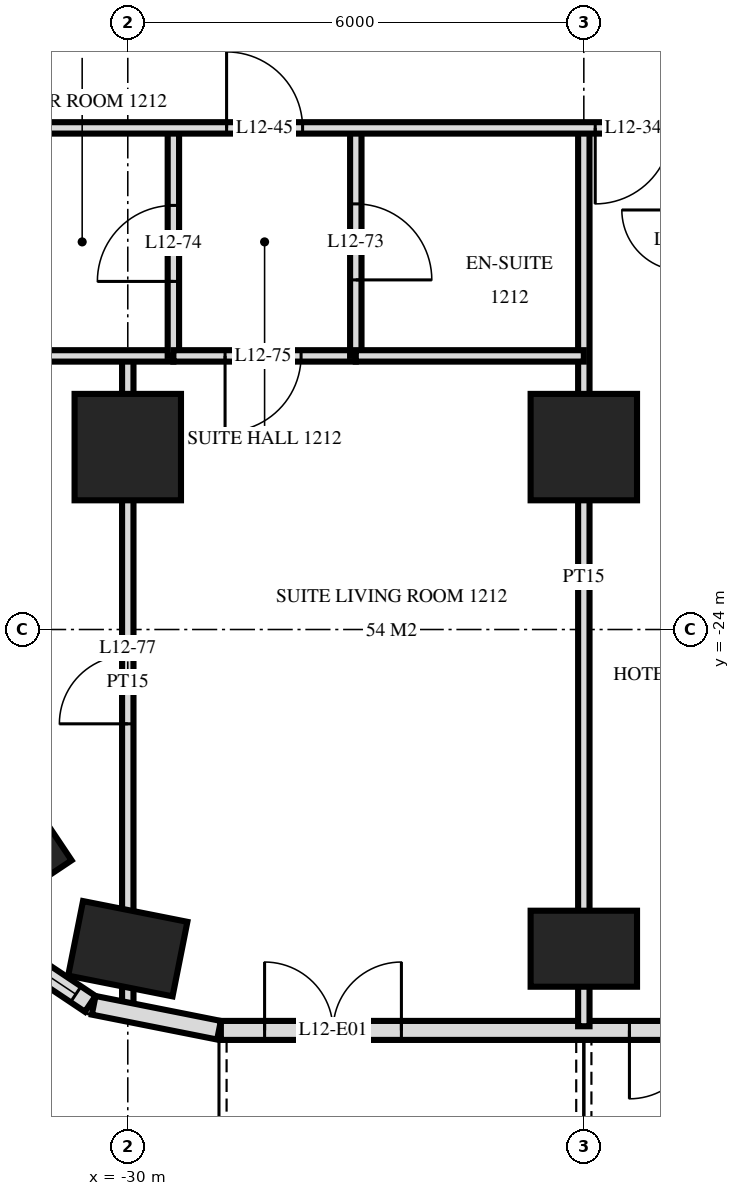
"""IFC4 building model, lengths in metres.
Left out: names, types, materials, properties, quantities, classifications, styles, units other than length and angle.
Written with IfcOpenShell. Run it as: python <this file> out.ifc"""

import sys

from ifc_helpers import new_model, si_unit, direction, frame, frame_2d, origin, origin_2d, place, context, subcontext, project, spatial, rectangle, extrude, element, fill, save


model = new_model("IFC4")
c1 = context("Model", 3, precision=1e-05, world=origin(), true_north=direction((0.0, 1.0)))
c2 = subcontext(c1, "Body", "Model", "MODEL_VIEW")
j1 = project(units=[si_unit("LENGTHUNIT", "METRE"), si_unit("PLANEANGLEUNIT", "RADIAN")], contexts=[c1])
p1 = place(None, origin())
s1 = spatial("IfcSite", under=j1, at=p1, CompositionType="ELEMENT")
p2 = place(p1, origin())
s2 = spatial("IfcBuilding", under=s1, at=p2, CompositionType="ELEMENT")
p3 = place(p2, frame((0.0, 0.0, 52.8)))
s3 = spatial("IfcBuildingStorey", under=s2, at=p3, CompositionType="ELEMENT", Elevation=52.8)
for number, where, z_axis, x_axis in (
    (1, (-31.544, -26.733, 0.0), (0.0, 0.0, 1.0), (-0.556, 0.831, 0.0)),
    (2, (-30.0, -28.2, 0.0), (0.0, 0.0, 1.0), (-0.981, 0.195, 0.0)),
):
    element("IfcColumn", number, at=place(p3, frame(where, z_axis=z_axis, x_axis=x_axis)), inside=s3, PredefinedType="COLUMN", context=c2, shape_type="SweptSolid", body=[
        extrude(rectangle(XDim=1.4, YDim=1.0, at=origin_2d()), origin(), (0.0, 0.0, 1.0), 3.6),
    ])
p4 = place(p3, frame((-30.0, -21.6, 0.0), z_axis=(0.0, 0.0, 1.0), x_axis=(1.0, 0.0, 0.0)))
e3 = element("IfcColumn", 3, at=p4, inside=s3, PredefinedType="COLUMN", context=c2, shape_type="SweptSolid", body=[
    extrude(rectangle(XDim=1.4, YDim=1.4, at=origin_2d()), origin(), (0.0, 0.0, 1.0), 3.6),
])
p5 = place(p3, frame((-24.0, -28.2, 0.0), z_axis=(0.0, 0.0, 1.0), x_axis=(1.0, 0.0, 0.0)))
e4 = element("IfcColumn", 4, at=p5, inside=s3, PredefinedType="COLUMN", context=c2, shape_type="SweptSolid", body=[
    extrude(rectangle(XDim=1.4, YDim=1.0, at=origin_2d()), origin(), (0.0, 0.0, 1.0), 3.6),
])
p6 = place(p3, frame((-24.0, -21.6, 0.0), z_axis=(0.0, 0.0, 1.0), x_axis=(1.0, 0.0, 0.0)))
e5 = element("IfcColumn", 5, at=p6, inside=s3, PredefinedType="COLUMN", context=c2, shape_type="SweptSolid", body=[
    extrude(rectangle(XDim=1.4, YDim=1.4, at=origin_2d()), origin(), (0.0, 0.0, 1.0), 3.6),
])
p7 = place(p3, frame((-31.871, -28.006, 0.0), z_axis=(0.0, 0.0, 1.0), x_axis=(0.831482937015, -0.55555029066, 0.0)))
e6 = element("IfcWall", 6, at=p7, inside=s3, PredefinedType="SOLIDWALL", context=c2, shape_type="SweptSolid", body=[
    extrude(rectangle(XDim=1.656, YDim=0.25, at=frame_2d((0.828, 0.0))), origin(), (0.0, 0.0, 1.0), 3.32),
])
p8 = place(p7, frame((0.228, 0.0, 0.9)))
e7 = element("IfcOpeningElement", 7, at=p8, cuts=e6, PredefinedType="OPENING", context=c2, shape_type="SweptSolid", body=[
    extrude(rectangle(XDim=1.2, YDim=1.5, at=frame_2d((0.6, 0.75))), frame((0.0, 0.135, 0.0), z_axis=(0.0, -1.0, 0.0), x_axis=(1.0, 0.0, 0.0)), (0.0, 0.0, 1.0), 0.27),
])
p9 = place(p3, frame((-30.449, -28.945, 0.0), z_axis=(0.0, 0.0, 1.0), x_axis=(0.980775640221, -0.19513878023, 0.0)))
e8 = element("IfcWall", 8, at=p9, inside=s3, PredefinedType="SOLIDWALL", context=c2, shape_type="SweptSolid", body=[
    extrude(rectangle(XDim=1.681, YDim=0.25, at=frame_2d((0.841, 0.0))), origin(), (0.0, 0.0, 1.0), 3.32),
])
p10 = place(p3, frame((-28.775, -29.275, 0.0), z_axis=(0.0, 0.0, 1.0), x_axis=(1.0, 0.0, 0.0)))
e9 = element("IfcWall", 9, at=p10, inside=s3, PredefinedType="SOLIDWALL", context=c2, shape_type="SweptSolid", body=[
    extrude(rectangle(XDim=57.551, YDim=0.25, at=frame_2d((28.775, 0.0))), origin(), (0.0, 0.0, 1.0), 3.32),
])
p11 = place(p10, frame((0.575, 0.0, 0.0)))
e10 = element("IfcOpeningElement", 10, at=p11, cuts=e9, PredefinedType="OPENING", context=c2, shape_type="SweptSolid", body=[
    extrude(rectangle(XDim=1.8, YDim=2.4, at=frame_2d((0.9, 1.2))), frame((0.0, 0.135, 0.0), z_axis=(0.0, -1.0, 0.0), x_axis=(1.0, 0.0, 0.0)), (0.0, 0.0, 1.0), 0.27),
])
p12 = place(p10, frame((5.375, 0.0, 0.0)))
e11 = element("IfcOpeningElement", 11, at=p12, cuts=e9, PredefinedType="OPENING", context=c2, shape_type="SweptSolid", body=[
    extrude(rectangle(XDim=1.8, YDim=2.4, at=frame_2d((0.9, 1.2))), frame((0.0, 0.135, 0.0), z_axis=(0.0, -1.0, 0.0), x_axis=(1.0, 0.0, 0.0)), (0.0, 0.0, 1.0), 0.27),
])
p13 = place(p10, frame((8.075, 0.0, 0.3)))
e12 = element("IfcOpeningElement", 12, at=p13, cuts=e9, PredefinedType="OPENING", context=c2, shape_type="SweptSolid", body=[
    extrude(rectangle(XDim=2.4, YDim=2.1, at=frame_2d((1.2, 1.05))), frame((0.0, 0.135, 0.0), z_axis=(0.0, -1.0, 0.0), x_axis=(1.0, 0.0, 0.0)), (0.0, 0.0, 1.0), 0.27),
])
p14 = place(p10, frame((11.375, 0.0, 0.0)))
e13 = element("IfcOpeningElement", 13, at=p14, cuts=e9, PredefinedType="OPENING", context=c2, shape_type="SweptSolid", body=[
    extrude(rectangle(XDim=1.8, YDim=2.4, at=frame_2d((0.9, 1.2))), frame((0.0, 0.135, 0.0), z_axis=(0.0, -1.0, 0.0), x_axis=(1.0, 0.0, 0.0)), (0.0, 0.0, 1.0), 0.27),
])
p15 = place(p10, frame((14.075, 0.0, 0.3)))
e14 = element("IfcOpeningElement", 14, at=p15, cuts=e9, PredefinedType="OPENING", context=c2, shape_type="SweptSolid", body=[
    extrude(rectangle(XDim=2.4, YDim=2.1, at=frame_2d((1.2, 1.05))), frame((0.0, 0.135, 0.0), z_axis=(0.0, -1.0, 0.0), x_axis=(1.0, 0.0, 0.0)), (0.0, 0.0, 1.0), 0.27),
])
p16 = place(p10, frame((17.375, 0.0, 0.0)))
e15 = element("IfcOpeningElement", 15, at=p16, cuts=e9, PredefinedType="OPENING", context=c2, shape_type="SweptSolid", body=[
    extrude(rectangle(XDim=1.8, YDim=2.4, at=frame_2d((0.9, 1.2))), frame((0.0, 0.135, 0.0), z_axis=(0.0, -1.0, 0.0), x_axis=(1.0, 0.0, 0.0)), (0.0, 0.0, 1.0), 0.27),
])
p17 = place(p10, frame((20.075, 0.0, 0.3)))
e16 = element("IfcOpeningElement", 16, at=p17, cuts=e9, PredefinedType="OPENING", context=c2, shape_type="SweptSolid", body=[
    extrude(rectangle(XDim=2.4, YDim=2.1, at=frame_2d((1.2, 1.05))), frame((0.0, 0.135, 0.0), z_axis=(0.0, -1.0, 0.0), x_axis=(1.0, 0.0, 0.0)), (0.0, 0.0, 1.0), 0.27),
])
p18 = place(p10, frame((23.075, 0.0, 0.3)))
e17 = element("IfcOpeningElement", 17, at=p18, cuts=e9, PredefinedType="OPENING", context=c2, shape_type="SweptSolid", body=[
    extrude(rectangle(XDim=2.4, YDim=2.1, at=frame_2d((1.2, 1.05))), frame((0.0, 0.135, 0.0), z_axis=(0.0, -1.0, 0.0), x_axis=(1.0, 0.0, 0.0)), (0.0, 0.0, 1.0), 0.27),
])
p19 = place(p10, frame((26.375, 0.0, 0.0)))
e18 = element("IfcOpeningElement", 18, at=p19, cuts=e9, PredefinedType="OPENING", context=c2, shape_type="SweptSolid", body=[
    extrude(rectangle(XDim=1.8, YDim=2.4, at=frame_2d((0.9, 1.2))), frame((0.0, 0.135, 0.0), z_axis=(0.0, -1.0, 0.0), x_axis=(1.0, 0.0, 0.0)), (0.0, 0.0, 1.0), 0.27),
])
p20 = place(p10, frame((29.375, 0.0, 0.0)))
e19 = element("IfcOpeningElement", 19, at=p20, cuts=e9, PredefinedType="OPENING", context=c2, shape_type="SweptSolid", body=[
    extrude(rectangle(XDim=1.8, YDim=2.4, at=frame_2d((0.9, 1.2))), frame((0.0, 0.135, 0.0), z_axis=(0.0, -1.0, 0.0), x_axis=(1.0, 0.0, 0.0)), (0.0, 0.0, 1.0), 0.27),
])
p21 = place(p10, frame((32.075, 0.0, 0.3)))
e20 = element("IfcOpeningElement", 20, at=p21, cuts=e9, PredefinedType="OPENING", context=c2, shape_type="SweptSolid", body=[
    extrude(rectangle(XDim=2.4, YDim=2.1, at=frame_2d((1.2, 1.05))), frame((0.0, 0.135, 0.0), z_axis=(0.0, -1.0, 0.0), x_axis=(1.0, 0.0, 0.0)), (0.0, 0.0, 1.0), 0.27),
])
p22 = place(p10, frame((35.075, 0.0, 0.3)))
e21 = element("IfcOpeningElement", 21, at=p22, cuts=e9, PredefinedType="OPENING", context=c2, shape_type="SweptSolid", body=[
    extrude(rectangle(XDim=2.4, YDim=2.1, at=frame_2d((1.2, 1.05))), frame((0.0, 0.135, 0.0), z_axis=(0.0, -1.0, 0.0), x_axis=(1.0, 0.0, 0.0)), (0.0, 0.0, 1.0), 0.27),
])
p23 = place(p10, frame((38.375, 0.0, 0.0)))
e22 = element("IfcOpeningElement", 22, at=p23, cuts=e9, PredefinedType="OPENING", context=c2, shape_type="SweptSolid", body=[
    extrude(rectangle(XDim=1.8, YDim=2.4, at=frame_2d((0.9, 1.2))), frame((0.0, 0.135, 0.0), z_axis=(0.0, -1.0, 0.0), x_axis=(1.0, 0.0, 0.0)), (0.0, 0.0, 1.0), 0.27),
])
p24 = place(p10, frame((41.375, 0.0, 0.0)))
e23 = element("IfcOpeningElement", 23, at=p24, cuts=e9, PredefinedType="OPENING", context=c2, shape_type="SweptSolid", body=[
    extrude(rectangle(XDim=1.8, YDim=2.4, at=frame_2d((0.9, 1.2))), frame((0.0, 0.135, 0.0), z_axis=(0.0, -1.0, 0.0), x_axis=(1.0, 0.0, 0.0)), (0.0, 0.0, 1.0), 0.27),
])
p25 = place(p10, frame((44.075, 0.0, 0.3)))
e24 = element("IfcOpeningElement", 24, at=p25, cuts=e9, PredefinedType="OPENING", context=c2, shape_type="SweptSolid", body=[
    extrude(rectangle(XDim=2.4, YDim=2.1, at=frame_2d((1.2, 1.05))), frame((0.0, 0.135, 0.0), z_axis=(0.0, -1.0, 0.0), x_axis=(1.0, 0.0, 0.0)), (0.0, 0.0, 1.0), 0.27),
])
p26 = place(p10, frame((47.075, 0.0, 0.3)))
e25 = element("IfcOpeningElement", 25, at=p26, cuts=e9, PredefinedType="OPENING", context=c2, shape_type="SweptSolid", body=[
    extrude(rectangle(XDim=2.4, YDim=2.1, at=frame_2d((1.2, 1.05))), frame((0.0, 0.135, 0.0), z_axis=(0.0, -1.0, 0.0), x_axis=(1.0, 0.0, 0.0)), (0.0, 0.0, 1.0), 0.27),
])
p27 = place(p10, frame((50.375, 0.0, 0.0)))
e26 = element("IfcOpeningElement", 26, at=p27, cuts=e9, PredefinedType="OPENING", context=c2, shape_type="SweptSolid", body=[
    extrude(rectangle(XDim=1.8, YDim=2.4, at=frame_2d((0.9, 1.2))), frame((0.0, 0.135, 0.0), z_axis=(0.0, -1.0, 0.0), x_axis=(1.0, 0.0, 0.0)), (0.0, 0.0, 1.0), 0.27),
])
p28 = place(p10, frame((53.375, 0.0, 0.0)))
e27 = element("IfcOpeningElement", 27, at=p28, cuts=e9, PredefinedType="OPENING", context=c2, shape_type="SweptSolid", body=[
    extrude(rectangle(XDim=1.8, YDim=2.4, at=frame_2d((0.9, 1.2))), frame((0.0, 0.135, 0.0), z_axis=(0.0, -1.0, 0.0), x_axis=(1.0, 0.0, 0.0)), (0.0, 0.0, 1.0), 0.27),
])
p29 = place(p3, frame((-24.0, -29.22, 0.0), z_axis=(0.0, 0.0, 1.0), x_axis=(0.0, 1.0, 0.0)))
e28 = element("IfcWall", 28, at=p29, inside=s3, PredefinedType="PARTITIONING", context=c2, shape_type="SweptSolid", body=[
    extrude(rectangle(XDim=11.82, YDim=0.15, at=frame_2d((5.91, 0.0))), origin(), (0.0, 0.0, 1.0), 3.32),
])
p30 = place(p3, frame((-27.0, -20.4, 0.0), z_axis=(0.0, 0.0, 1.0), x_axis=(0.0, 1.0, 0.0)))
e29 = element("IfcWall", 29, at=p30, inside=s3, PredefinedType="PARTITIONING", context=c2, shape_type="SweptSolid", body=[
    extrude(rectangle(XDim=3.0, YDim=0.15, at=frame_2d((1.5, 0.0))), origin(), (0.0, 0.0, 1.0), 3.32),
])
p31 = place(p30, frame((1.0, 0.0, 0.0)))
e30 = element("IfcOpeningElement", 30, at=p31, cuts=e29, PredefinedType="OPENING", context=c2, shape_type="SweptSolid", body=[
    extrude(rectangle(XDim=1.0, YDim=2.1, at=frame_2d((0.5, 1.05))), frame((0.0, 0.085, 0.0), z_axis=(0.0, -1.0, 0.0), x_axis=(1.0, 0.0, 0.0)), (0.0, 0.0, 1.0), 0.17),
])
p32 = place(p3, frame((-29.4, -20.4, 0.0), z_axis=(0.0, 0.0, 1.0), x_axis=(0.0, 1.0, 0.0)))
e31 = element("IfcWall", 31, at=p32, inside=s3, PredefinedType="PARTITIONING", context=c2, shape_type="SweptSolid", body=[
    extrude(rectangle(XDim=3.0, YDim=0.15, at=frame_2d((1.5, 0.0))), origin(), (0.0, 0.0, 1.0), 3.32),
])
p33 = place(p32, frame((0.98, 0.0, 0.0)))
e32 = element("IfcOpeningElement", 32, at=p33, cuts=e31, PredefinedType="OPENING", context=c2, shape_type="SweptSolid", body=[
    extrude(rectangle(XDim=1.0, YDim=2.1, at=frame_2d((0.5, 1.05))), frame((0.0, 0.085, 0.0), z_axis=(0.0, -1.0, 0.0), x_axis=(1.0, 0.0, 0.0)), (0.0, 0.0, 1.0), 0.17),
])
p34 = place(p3, frame((-30.0, -28.978, 0.0), z_axis=(0.0, 0.0, 1.0), x_axis=(0.0, 1.0, 0.0)))
e33 = element("IfcWall", 33, at=p34, inside=s3, PredefinedType="PARTITIONING", context=c2, shape_type="SweptSolid", body=[
    extrude(rectangle(XDim=8.578, YDim=0.15, at=frame_2d((4.289, 0.0))), origin(), (0.0, 0.0, 1.0), 3.32),
])
p35 = place(p34, frame((3.737, 0.0, 0.0)))
e34 = element("IfcOpeningElement", 34, at=p35, cuts=e33, PredefinedType="OPENING", context=c2, shape_type="SweptSolid", body=[
    extrude(rectangle(XDim=0.9, YDim=2.1, at=frame_2d((0.45, 1.05))), frame((0.0, 0.085, 0.0), z_axis=(0.0, -1.0, 0.0), x_axis=(1.0, 0.0, 0.0)), (0.0, 0.0, 1.0), 0.17),
])
p36 = place(p3, frame((-29.4, -20.4, 0.0), z_axis=(0.0, 0.0, 1.0), x_axis=(1.0, 0.0, 0.0)))
e35 = element("IfcWall", 35, at=p36, inside=s3, PredefinedType="PARTITIONING", context=c2, shape_type="SweptSolid", body=[
    extrude(rectangle(XDim=2.4, YDim=0.15, at=frame_2d((1.2, 0.0))), origin(), (0.0, 0.0, 1.0), 3.32),
])
p37 = place(p36, frame((0.68, 0.0, 0.0)))
e36 = element("IfcOpeningElement", 36, at=p37, cuts=e35, PredefinedType="OPENING", context=c2, shape_type="SweptSolid", body=[
    extrude(rectangle(XDim=1.0, YDim=2.1, at=frame_2d((0.5, 1.05))), frame((0.0, 0.085, 0.0), z_axis=(0.0, -1.0, 0.0), x_axis=(1.0, 0.0, 0.0)), (0.0, 0.0, 1.0), 0.17),
])
p38 = place(p3, frame((-31.8, -20.4, 0.0), z_axis=(0.0, 0.0, 1.0), x_axis=(1.0, 0.0, 0.0)))
e37 = element("IfcWall", 37, at=p38, inside=s3, PredefinedType="PARTITIONING", context=c2, shape_type="SweptSolid", body=[
    extrude(rectangle(XDim=2.4, YDim=0.15, at=frame_2d((1.2, 0.0))), origin(), (0.0, 0.0, 1.0), 3.32),
])
p39 = place(p3, frame((-27.0, -20.4, 0.0), z_axis=(0.0, 0.0, 1.0), x_axis=(1.0, 0.0, 0.0)))
e38 = element("IfcWall", 38, at=p39, inside=s3, PredefinedType="PARTITIONING", context=c2, shape_type="SweptSolid", body=[
    extrude(rectangle(XDim=3.0, YDim=0.15, at=frame_2d((1.5, 0.0))), origin(), (0.0, 0.0, 1.0), 3.32),
])
p40 = place(p3, frame((-33.12, -17.4, 0.0), z_axis=(0.0, 0.0, 1.0), x_axis=(1.0, 0.0, 0.0)))
e39 = element("IfcWall", 39, at=p40, inside=s3, PredefinedType="PARTITIONING", context=c2, shape_type="SweptSolid", body=[
    extrude(rectangle(XDim=66.24, YDim=0.15, at=frame_2d((33.12, 0.0))), origin(), (0.0, 0.0, 1.0), 3.32),
])
p41 = place(p40, frame((9.27, 0.0, 0.0)))
e40 = element("IfcOpeningElement", 40, at=p41, cuts=e39, PredefinedType="OPENING", context=c2, shape_type="SweptSolid", body=[
    extrude(rectangle(XDim=1.0, YDim=2.1, at=frame_2d((0.5, 1.05))), frame((0.0, 0.085, 0.0), z_axis=(0.0, -1.0, 0.0), x_axis=(1.0, 0.0, 0.0)), (0.0, 0.0, 1.0), 0.17),
])
p42 = place(p40, frame((13.97, 0.0, 0.0)))
e41 = element("IfcOpeningElement", 41, at=p42, cuts=e39, PredefinedType="OPENING", context=c2, shape_type="SweptSolid", body=[
    extrude(rectangle(XDim=1.0, YDim=2.1, at=frame_2d((0.5, 1.05))), frame((0.0, 0.085, 0.0), z_axis=(0.0, -1.0, 0.0), x_axis=(1.0, 0.0, 0.0)), (0.0, 0.0, 1.0), 0.17),
])
p43 = place(p40, frame((15.27, 0.0, 0.0)))
e42 = element("IfcOpeningElement", 42, at=p43, cuts=e39, PredefinedType="OPENING", context=c2, shape_type="SweptSolid", body=[
    extrude(rectangle(XDim=1.0, YDim=2.1, at=frame_2d((0.5, 1.05))), frame((0.0, 0.085, 0.0), z_axis=(0.0, -1.0, 0.0), x_axis=(1.0, 0.0, 0.0)), (0.0, 0.0, 1.0), 0.17),
])
p44 = place(p40, frame((19.97, 0.0, 0.0)))
e43 = element("IfcOpeningElement", 43, at=p44, cuts=e39, PredefinedType="OPENING", context=c2, shape_type="SweptSolid", body=[
    extrude(rectangle(XDim=1.0, YDim=2.1, at=frame_2d((0.5, 1.05))), frame((0.0, 0.085, 0.0), z_axis=(0.0, -1.0, 0.0), x_axis=(1.0, 0.0, 0.0)), (0.0, 0.0, 1.0), 0.17),
])
p45 = place(p40, frame((22.27, 0.0, 0.0)))
e44 = element("IfcOpeningElement", 44, at=p45, cuts=e39, PredefinedType="OPENING", context=c2, shape_type="SweptSolid", body=[
    extrude(rectangle(XDim=1.0, YDim=2.1, at=frame_2d((0.5, 1.05))), frame((0.0, 0.085, 0.0), z_axis=(0.0, -1.0, 0.0), x_axis=(1.0, 0.0, 0.0)), (0.0, 0.0, 1.0), 0.17),
])
p46 = place(p40, frame((28.97, 0.0, 0.0)))
e45 = element("IfcOpeningElement", 45, at=p46, cuts=e39, PredefinedType="OPENING", context=c2, shape_type="SweptSolid", body=[
    extrude(rectangle(XDim=1.0, YDim=2.1, at=frame_2d((0.5, 1.05))), frame((0.0, 0.085, 0.0), z_axis=(0.0, -1.0, 0.0), x_axis=(1.0, 0.0, 0.0)), (0.0, 0.0, 1.0), 0.17),
])
p47 = place(p40, frame((30.27, 0.0, 0.0)))
e46 = element("IfcOpeningElement", 46, at=p47, cuts=e39, PredefinedType="OPENING", context=c2, shape_type="SweptSolid", body=[
    extrude(rectangle(XDim=1.0, YDim=2.1, at=frame_2d((0.5, 1.05))), frame((0.0, 0.085, 0.0), z_axis=(0.0, -1.0, 0.0), x_axis=(1.0, 0.0, 0.0)), (0.0, 0.0, 1.0), 0.17),
])
p48 = place(p40, frame((34.97, 0.0, 0.0)))
e47 = element("IfcOpeningElement", 47, at=p48, cuts=e39, PredefinedType="OPENING", context=c2, shape_type="SweptSolid", body=[
    extrude(rectangle(XDim=1.0, YDim=2.1, at=frame_2d((0.5, 1.05))), frame((0.0, 0.085, 0.0), z_axis=(0.0, -1.0, 0.0), x_axis=(1.0, 0.0, 0.0)), (0.0, 0.0, 1.0), 0.17),
])
p49 = place(p40, frame((36.27, 0.0, 0.0)))
e48 = element("IfcOpeningElement", 48, at=p49, cuts=e39, PredefinedType="OPENING", context=c2, shape_type="SweptSolid", body=[
    extrude(rectangle(XDim=1.0, YDim=2.1, at=frame_2d((0.5, 1.05))), frame((0.0, 0.085, 0.0), z_axis=(0.0, -1.0, 0.0), x_axis=(1.0, 0.0, 0.0)), (0.0, 0.0, 1.0), 0.17),
])
p50 = place(p40, frame((39.82, 0.0, 0.0)))
e49 = element("IfcOpeningElement", 49, at=p50, cuts=e39, PredefinedType="OPENING", context=c2, shape_type="SweptSolid", body=[
    extrude(rectangle(XDim=1.0, YDim=2.1, at=frame_2d((0.5, 1.05))), frame((0.0, 0.085, 0.0), z_axis=(0.0, -1.0, 0.0), x_axis=(1.0, 0.0, 0.0)), (0.0, 0.0, 1.0), 0.17),
])
p51 = place(p40, frame((51.27, 0.0, 0.0)))
e50 = element("IfcOpeningElement", 50, at=p51, cuts=e39, PredefinedType="OPENING", context=c2, shape_type="SweptSolid", body=[
    extrude(rectangle(XDim=1.0, YDim=2.1, at=frame_2d((0.5, 1.05))), frame((0.0, 0.085, 0.0), z_axis=(0.0, -1.0, 0.0), x_axis=(1.0, 0.0, 0.0)), (0.0, 0.0, 1.0), 0.17),
])
p52 = place(p40, frame((4.42, 0.0, 0.0)))
e51 = element("IfcOpeningElement", 51, at=p52, cuts=e39, PredefinedType="OPENING", context=c2, shape_type="SweptSolid", body=[
    extrude(rectangle(XDim=1.0, YDim=2.1, at=frame_2d((0.5, 1.05))), frame((0.0, 0.085, 0.0), z_axis=(0.0, -1.0, 0.0), x_axis=(1.0, 0.0, 0.0)), (0.0, 0.0, 1.0), 0.17),
])
p53 = place(p40, frame((54.82, 0.0, 0.0)))
e52 = element("IfcOpeningElement", 52, at=p53, cuts=e39, PredefinedType="OPENING", context=c2, shape_type="SweptSolid", body=[
    extrude(rectangle(XDim=1.0, YDim=2.1, at=frame_2d((0.5, 1.05))), frame((0.0, 0.085, 0.0), z_axis=(0.0, -1.0, 0.0), x_axis=(1.0, 0.0, 0.0)), (0.0, 0.0, 1.0), 0.17),
])
p54 = place(p8, origin())
e53 = element("IfcWindow", 53, at=p54, inside=s3, PartitioningType="SINGLE_PANEL", PredefinedType="WINDOW", context=c2, shape_type="SweptSolid", body=[
    extrude(rectangle(XDim=1.2, YDim=1.5, at=frame_2d((0.6, 0.75))), frame((0.0, 0.03, 0.0), z_axis=(0.0, -1.0, 0.0), x_axis=(1.0, 0.0, 0.0)), (0.0, 0.0, 1.0), 0.06),
])
fill(e7, e53)
p55 = place(p11, origin())
e54 = element("IfcDoor", 54, at=p55, inside=s3, OperationType="DOUBLE_DOOR_SINGLE_SWING", PredefinedType="DOOR", context=c2, shape_type="SweptSolid", body=[
    extrude(rectangle(XDim=1.8, YDim=2.4, at=frame_2d((0.9, 1.2))), frame((0.0, 0.025, 0.0), z_axis=(0.0, -1.0, 0.0), x_axis=(1.0, 0.0, 0.0)), (0.0, 0.0, 1.0), 0.05),
])
fill(e10, e54)
p56 = place(p12, frame((0.9, 0.0, 0.0), z_axis=(0.0, 0.0, 1.0), x_axis=(-1.0, 0.0, 0.0)))
e55 = element("IfcDoor", 55, at=p56, inside=s3, OperationType="DOUBLE_DOOR_SINGLE_SWING", PredefinedType="DOOR", context=c2, shape_type="SweptSolid", body=[
    extrude(rectangle(XDim=1.8, YDim=2.4, at=frame_2d((0.0, 1.2))), frame((0.0, -0.025, 0.0), z_axis=(0.0, 1.0, 0.0), x_axis=(-1.0, 0.0, 0.0)), (0.0, 0.0, 1.0), 0.05),
])
fill(e11, e55)
p57 = place(p41, frame((0.5, 0.0, 0.0), z_axis=(0.0, 0.0, 1.0), x_axis=(-1.0, 0.0, 0.0)))
e56 = element("IfcDoor", 56, at=p57, inside=s3, OperationType="SINGLE_SWING_LEFT", PredefinedType="DOOR", context=c2, shape_type="SweptSolid", body=[
    extrude(rectangle(XDim=1.0, YDim=2.1, at=frame_2d((0.0, 1.05))), frame((0.0, -0.025, 0.0), z_axis=(0.0, 1.0, 0.0), x_axis=(-1.0, 0.0, 0.0)), (0.0, 0.0, 1.0), 0.05),
])
fill(e40, e56)
p58 = place(p52, origin())
e57 = element("IfcDoor", 57, at=p58, inside=s3, OperationType="SINGLE_SWING_RIGHT", PredefinedType="DOOR", context=c2, shape_type="SweptSolid", body=[
    extrude(rectangle(XDim=1.0, YDim=2.1, at=frame_2d((0.5, 1.05))), frame((0.0, 0.025, 0.0), z_axis=(0.0, -1.0, 0.0), x_axis=(1.0, 0.0, 0.0)), (0.0, 0.0, 1.0), 0.05),
])
fill(e51, e57)
p59 = place(p31, frame((0.5, 0.0, 0.0), z_axis=(0.0, 0.0, 1.0), x_axis=(-1.0, 0.0, 0.0)))
e58 = element("IfcDoor", 58, at=p59, inside=s3, OperationType="SINGLE_SWING_LEFT", PredefinedType="DOOR", context=c2, shape_type="SweptSolid", body=[
    extrude(rectangle(XDim=1.0, YDim=2.1, at=frame_2d((0.0, 1.05))), frame((0.0, -0.025, 0.0), z_axis=(0.0, 1.0, 0.0), x_axis=(-1.0, 0.0, 0.0)), (0.0, 0.0, 1.0), 0.05),
])
fill(e30, e58)
p60 = place(p33, origin())
e59 = element("IfcDoor", 59, at=p60, inside=s3, OperationType="SINGLE_SWING_RIGHT", PredefinedType="DOOR", context=c2, shape_type="SweptSolid", body=[
    extrude(rectangle(XDim=1.0, YDim=2.1, at=frame_2d((0.5, 1.05))), frame((0.0, 0.025, 0.0), z_axis=(0.0, -1.0, 0.0), x_axis=(1.0, 0.0, 0.0)), (0.0, 0.0, 1.0), 0.05),
])
fill(e32, e59)
p61 = place(p37, frame((0.5, 0.0, 0.0), z_axis=(0.0, 0.0, 1.0), x_axis=(-1.0, 0.0, 0.0)))
e60 = element("IfcDoor", 60, at=p61, inside=s3, OperationType="SINGLE_SWING_LEFT", PredefinedType="DOOR", context=c2, shape_type="SweptSolid", body=[
    extrude(rectangle(XDim=1.0, YDim=2.1, at=frame_2d((0.0, 1.05))), frame((0.0, -0.025, 0.0), z_axis=(0.0, 1.0, 0.0), x_axis=(-1.0, 0.0, 0.0)), (0.0, 0.0, 1.0), 0.05),
])
fill(e36, e60)
p62 = place(p35, origin())
e61 = element("IfcDoor", 61, at=p62, inside=s3, OperationType="SINGLE_SWING_RIGHT", PredefinedType="DOOR", context=c2, shape_type="SweptSolid", body=[
    extrude(rectangle(XDim=0.9, YDim=2.1, at=frame_2d((0.45, 1.05))), frame((0.0, 0.025, 0.0), z_axis=(0.0, -1.0, 0.0), x_axis=(1.0, 0.0, 0.0)), (0.0, 0.0, 1.0), 0.05),
])
fill(e34, e61)
save(model, sys.argv[1])
